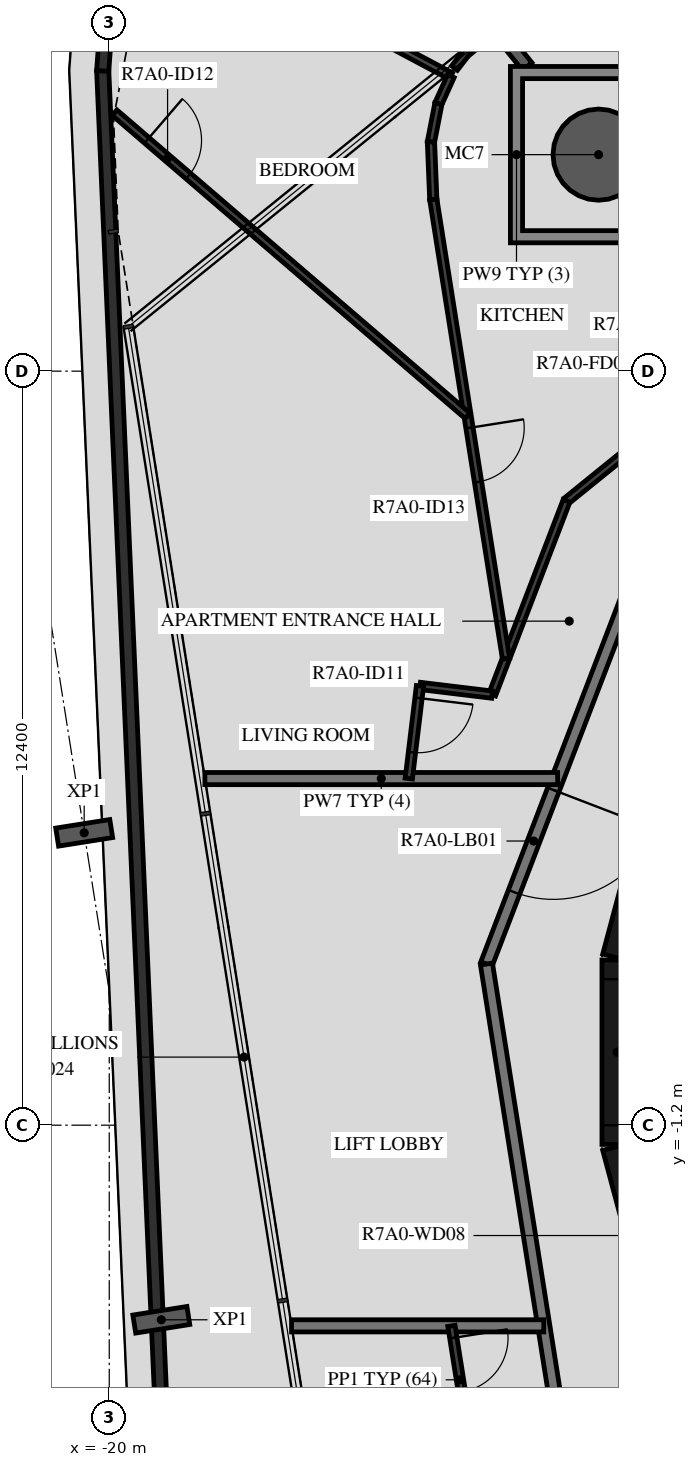
"""IFC4 building model, lengths in metres.
Left out: names, types, materials, properties, quantities, classifications, styles, units other than length and angle.
Written with IfcOpenShell. Run it as: python <this file> out.ifc"""

import sys

from ifc_helpers import new_model, si_unit, direction, frame, frame_2d, origin, origin_2d, place, context, subcontext, project, spatial, polyline, rectangle, hollow_circle, i_section, outline, extrude, element, fill, save


model = new_model("IFC4")
c1 = context("Model", 3, precision=1e-05, world=origin(), true_north=direction((0.0, 1.0)))
c2 = subcontext(c1, "Body", "Model", "MODEL_VIEW")
j1 = project(units=[si_unit("LENGTHUNIT", "METRE"), si_unit("PLANEANGLEUNIT", "RADIAN")], contexts=[c1])
p1 = place(None, origin())
s1 = spatial("IfcSite", under=j1, at=p1, CompositionType="ELEMENT")
p2 = place(p1, origin())
s2 = spatial("IfcBuilding", under=s1, at=p2, CompositionType="ELEMENT")
p3 = place(p2, frame((0.0, 0.0, 263.4)))
s3 = spatial("IfcBuildingStorey", under=s2, at=p3, CompositionType="ELEMENT", Elevation=263.4)
p4 = place(p3, frame((-11.953, 14.76, -0.45), z_axis=(0.0, 0.0, 1.0), x_axis=(1.0, 0.0, 0.0)))
e1 = element("IfcColumn", 1, at=p4, inside=s3, PredefinedType="COLUMN", context=c2, shape_type="SweptSolid", body=[
    extrude(hollow_circle(Radius=0.75, WallThickness=0.035, at=origin_2d()), origin(), (0.0, 0.0, 1.0), 3.57),
])
for number, where, z_axis, x_axis in (
    (2, (-20.412, 3.608, -0.45), (0.0, 0.0, 1.0), (-0.156, 0.988, 0.0)),
    (3, (-19.144, -4.4, -0.45), (0.0, 0.0, 1.0), (-0.156, 0.988, 0.0)),
):
    element("IfcColumn", number, at=place(p3, frame(where, z_axis=z_axis, x_axis=x_axis)), inside=s3, PredefinedType="COLUMN", context=c2, shape_type="SweptSolid", body=[
        extrude(i_section(OverallWidth=0.3, OverallDepth=0.9, WebThickness=0.019, FlangeThickness=0.035, FilletRadius=0.03, at=origin_2d()), origin(), (0.0, 0.0, 1.0), 3.57),
    ])
p5 = place(p3, frame((-18.624, -17.834, 0.03), z_axis=(0.0, 0.0, 1.0), x_axis=(-0.043617910627, 0.999048286057, 0.0)))
e4 = element("IfcWall", 4, at=p5, inside=s3, PredefinedType="PARAPET", context=c2, shape_type="SweptSolid", body=[
    extrude(rectangle(XDim=34.009, YDim=0.2, at=frame_2d((17.004, 0.0))), origin(), (0.0, 0.0, 1.0), 1.5),
])
p6 = place(p3, frame((-20.108, 16.137, 0.03), z_axis=(0.0, 0.0, 1.0), x_axis=(0.072676527807, 0.997355564634, 0.0)))
e5 = element("IfcWall", 5, at=p6, inside=s3, PredefinedType="PARAPET", context=c2, shape_type="SweptSolid", body=[
    extrude(rectangle(XDim=2.257, YDim=0.2, at=frame_2d((1.129, 0.0))), origin(), (0.0, 0.0, 1.0), 1.5),
])
p7 = place(p3, frame((-10.858, 4.479, 0.0), z_axis=(0.0, 0.0, 1.0), x_axis=(-0.258734743916, -0.965948410781, 0.0)))
e6 = element("IfcWall", 6, at=p7, inside=s3, PredefinedType="SHEAR", context=c2, shape_type="SweptSolid", body=[
    extrude(rectangle(XDim=3.033, YDim=0.5, at=frame_2d((1.516, 0.0))), origin(), (0.0, 0.0, 1.0), 3.12),
])
p8 = place(p3, frame((-11.647, 1.516, 0.0), z_axis=(0.0, 0.0, 1.0), x_axis=(0.0, -1.0, 0.0)))
e7 = element("IfcWall", 7, at=p8, inside=s3, PredefinedType="SHEAR", context=c2, shape_type="SweptSolid", body=[
    extrude(rectangle(XDim=3.033, YDim=0.5, at=frame_2d((1.516, 0.0))), origin(), (0.0, 0.0, 1.0), 3.12),
])
p9 = place(p8, frame((0.316, 0.0, 0.0)))
e8 = element("IfcOpeningElement", 8, at=p9, cuts=e7, PredefinedType="OPENING", context=c2, shape_type="SweptSolid", body=[
    extrude(rectangle(XDim=2.4, YDim=2.1, at=frame_2d((1.2, 1.05))), frame((0.0, 0.26, 0.0), z_axis=(0.0, -1.0, 0.0), x_axis=(1.0, 0.0, 0.0)), (0.0, 0.0, 1.0), 0.52),
])
p10 = place(p3, frame((-11.643, -1.55, 0.0), z_axis=(0.0, 0.0, 1.0), x_axis=(0.258734743916, -0.965948410781, 0.0)))
e9 = element("IfcWall", 9, at=p10, inside=s3, PredefinedType="SHEAR", context=c2, shape_type="SweptSolid", body=[
    extrude(rectangle(XDim=3.033, YDim=0.5, at=frame_2d((1.516, 0.0))), origin(), (0.0, 0.0, 1.0), 3.12),
])
p11 = place(p10, frame((1.066, 0.0, 0.0)))
e10 = element("IfcOpeningElement", 10, at=p11, cuts=e9, PredefinedType="OPENING", context=c2, shape_type="SweptSolid", body=[
    extrude(rectangle(XDim=0.9, YDim=2.1, at=frame_2d((0.45, 1.05))), frame((0.0, 0.26, 0.0), z_axis=(0.0, -1.0, 0.0), x_axis=(1.0, 0.0, 0.0)), (0.0, 0.0, 1.0), 0.52),
])
p12 = place(p3, frame((-11.223, 8.154, 0.0), z_axis=(0.0, 0.0, 1.0), x_axis=(-0.358341090983, -0.93359073609, 0.0)))
e11 = element("IfcWall", 11, at=p12, inside=s3, PredefinedType="STANDARD", context=c2, shape_type="SweptSolid", body=[
    extrude(rectangle(XDim=7.181, YDim=0.2, at=frame_2d((3.59, 0.0))), origin(), (0.0, 0.0, 1.0), 3.12),
])
p13 = place(p12, frame((4.114, 0.0, 0.0)))
e12 = element("IfcOpeningElement", 12, at=p13, cuts=e11, PredefinedType="OPENING", context=c2, shape_type="SweptSolid", body=[
    extrude(rectangle(XDim=1.8, YDim=2.1, at=frame_2d((0.9, 1.05))), frame((0.0, 0.11, 0.0), z_axis=(0.0, -1.0, 0.0), x_axis=(1.0, 0.0, 0.0)), (0.0, 0.0, 1.0), 0.22),
])
p14 = place(p3, frame((-13.797, 1.45, 0.0), z_axis=(0.0, 0.0, 1.0), x_axis=(0.156421704315, -0.987690361611, 0.0)))
e13 = element("IfcWall", 13, at=p14, inside=s3, PredefinedType="STANDARD", context=c2, shape_type="SweptSolid", body=[
    extrude(rectangle(XDim=7.181, YDim=0.2, at=frame_2d((3.591, 0.0))), origin(), (0.0, 0.0, 1.0), 3.12),
])
p15 = place(p3, frame((-12.626, 4.5, 0.0), z_axis=(0.0, 0.0, 1.0), x_axis=(-1.0, 0.0, 0.0)))
e14 = element("IfcWall", 14, at=p15, inside=s3, PredefinedType="STANDARD", context=c2, shape_type="SweptSolid", body=[
    extrude(rectangle(XDim=5.802, YDim=0.2, at=frame_2d((2.901, 0.0))), origin(), (0.0, 0.0, 1.0), 3.12),
])
p16 = place(p3, frame((-17.002, -4.5, 0.0), z_axis=(0.0, 0.0, 1.0), x_axis=(1.0, 0.0, 0.0)))
e15 = element("IfcWall", 15, at=p16, inside=s3, PredefinedType="STANDARD", context=c2, shape_type="SweptSolid", body=[
    extrude(rectangle(XDim=4.148, YDim=0.2, at=frame_2d((2.074, 0.0))), origin(), (0.0, 0.0, 1.0), 3.12),
])
p17 = place(p3, frame((-16.953, 20.936, 0.0), z_axis=(0.0, 0.0, 1.0), x_axis=(0.629331057166, -0.777137324085, 0.0)))
e16 = element("IfcWall", 16, at=p17, inside=s3, PredefinedType="STANDARD", context=c2, shape_type="SweptSolid", body=[
    extrude(rectangle(XDim=6.08, YDim=0.2, at=frame_2d((3.04, 0.0))), origin(), (0.0, 0.0, 1.0), 3.12),
])
p18 = place(p3, frame((-9.393, 11.566, 0.0), z_axis=(0.0, 0.0, 1.0), x_axis=(-0.777100258587, -0.629376825205, 0.0)))
e17 = element("IfcWall", 17, at=p18, inside=s3, PredefinedType="PARTITIONING", context=c2, shape_type="SweptSolid", body=[
    extrude(rectangle(XDim=3.971, YDim=0.12, at=frame_2d((1.986, 0.0))), origin(), (0.0, 0.0, 1.0), 3.12),
])
p19 = place(p18, frame((0.2, 0.0, 0.0)))
e18 = element("IfcOpeningElement", 18, at=p19, cuts=e17, PredefinedType="OPENING", context=c2, shape_type="SweptSolid", body=[
    extrude(rectangle(XDim=0.9, YDim=2.1, at=frame_2d((0.45, 1.05))), frame((0.0, 0.07, 0.0), z_axis=(0.0, -1.0, 0.0), x_axis=(1.0, 0.0, 0.0)), (0.0, 0.0, 1.0), 0.14),
])
p20 = place(p3, frame((-12.479, 9.067, 0.0), z_axis=(0.0, 0.0, 1.0), x_axis=(-0.358394302064, -0.933570310286, 0.0)))
e19 = element("IfcWall", 19, at=p20, inside=s3, PredefinedType="PARTITIONING", context=c2, shape_type="SweptSolid", body=[
    extrude(rectangle(XDim=3.414, YDim=0.12, at=frame_2d((1.707, 0.0))), origin(), (0.0, 0.0, 1.0), 3.12),
])
p21 = place(p3, frame((-13.703, 5.88, 0.0), z_axis=(0.0, 0.0, 1.0), x_axis=(-0.992763323859, 0.120087396509, 0.0)))
e20 = element("IfcWall", 20, at=p21, inside=s3, PredefinedType="PARTITIONING", context=c2, shape_type="SweptSolid", body=[
    extrude(rectangle(XDim=1.195, YDim=0.12, at=frame_2d((0.598, 0.0))), origin(), (0.0, 0.0, 1.0), 3.12),
])
p22 = place(p3, frame((-14.89, 6.024, 0.0), z_axis=(0.0, 0.0, 1.0), x_axis=(-0.120255360044, -0.992742992109, 0.0)))
e21 = element("IfcWall", 21, at=p22, inside=s3, PredefinedType="PARTITIONING", context=c2, shape_type="SweptSolid", body=[
    extrude(rectangle(XDim=1.535, YDim=0.12, at=frame_2d((0.768, 0.0))), origin(), (0.0, 0.0, 1.0), 3.12),
])
p23 = place(p22, frame((0.2, 0.0, 0.0)))
e22 = element("IfcOpeningElement", 22, at=p23, cuts=e21, PredefinedType="OPENING", context=c2, shape_type="SweptSolid", body=[
    extrude(rectangle(XDim=0.9, YDim=2.1, at=frame_2d((0.45, 1.05))), frame((0.0, 0.07, 0.0), z_axis=(0.0, -1.0, 0.0), x_axis=(1.0, 0.0, 0.0)), (0.0, 0.0, 1.0), 0.14),
])
p24 = place(p3, frame((-14.323, 16.184, 0.0), z_axis=(0.0, 0.0, 1.0), x_axis=(0.611198506308, 0.791477343887, 0.0)))
e23 = element("IfcWall", 23, at=p24, inside=s3, PredefinedType="PARTITIONING", context=c2, shape_type="SweptSolid", body=[
    extrude(rectangle(XDim=0.642, YDim=0.12, at=frame_2d((0.321, 0.0))), origin(), (0.0, 0.0, 1.0), 3.12),
])
p25 = place(p3, frame((-18.983, 18.499, 0.0), z_axis=(0.0, 0.0, 1.0), x_axis=(0.882948840489, -0.469469216328, 0.0)))
e24 = element("IfcWall", 24, at=p25, inside=s3, PredefinedType="PARTITIONING", context=c2, shape_type="SweptSolid", body=[
    extrude(rectangle(XDim=5.211, YDim=0.12, at=frame_2d((2.605, 0.0))), origin(), (0.0, 0.0, 1.0), 2.73),
])
p26 = place(p25, frame((0.2, 0.0, 0.0)))
e25 = element("IfcOpeningElement", 25, at=p26, cuts=e24, PredefinedType="OPENING", context=c2, shape_type="SweptSolid", body=[
    extrude(rectangle(XDim=0.8, YDim=2.1, at=frame_2d((0.4, 1.05))), frame((0.0, 0.07, 0.0), z_axis=(0.0, -1.0, 0.0), x_axis=(1.0, 0.0, 0.0)), (0.0, 0.0, 1.0), 0.14),
])
p27 = place(p3, frame((-14.382, 16.052, 0.0), z_axis=(0.0, 0.0, 1.0), x_axis=(-0.412099912529, -0.911138662385, 0.0)))
e26 = element("IfcWall", 26, at=p27, inside=s3, PredefinedType="PARTITIONING", context=c2, shape_type="SweptSolid", body=[
    extrude(rectangle(XDim=0.497, YDim=0.12, at=frame_2d((0.249, 0.0))), origin(), (0.0, 0.0, 1.0), 3.12),
])
p28 = place(p3, frame((-14.587, 15.6, 0.0), z_axis=(0.0, 0.0, 1.0), x_axis=(-0.190920556667, -0.98160549155, 0.0)))
e27 = element("IfcWall", 27, at=p28, inside=s3, PredefinedType="PARTITIONING", context=c2, shape_type="SweptSolid", body=[
    extrude(rectangle(XDim=0.642, YDim=0.12, at=frame_2d((0.321, 0.0))), origin(), (0.0, 0.0, 1.0), 3.12),
])
p29 = place(p3, frame((-14.709, 14.969, 0.0), z_axis=(0.0, 0.0, 1.0), x_axis=(0.040729848009, -0.999170195453, 0.0)))
e28 = element("IfcWall", 28, at=p29, inside=s3, PredefinedType="PARTITIONING", context=c2, shape_type="SweptSolid", body=[
    extrude(rectangle(XDim=0.947, YDim=0.12, at=frame_2d((0.474, 0.0))), origin(), (0.0, 0.0, 1.0), 3.12),
])
p30 = place(p3, frame((-14.671, 14.023, 0.0), z_axis=(0.0, 0.0, 1.0), x_axis=(0.156438190471, -0.987687750538, 0.0)))
e29 = element("IfcWall", 29, at=p30, inside=s3, PredefinedType="PARTITIONING", context=c2, shape_type="SweptSolid", body=[
    extrude(rectangle(XDim=7.644, YDim=0.12, at=frame_2d((3.822, 0.0))), origin(), (0.0, 0.0, 1.0), 3.12),
])
p31 = place(p30, frame((3.803, 0.0, 0.0)))
e30 = element("IfcOpeningElement", 30, at=p31, cuts=e29, PredefinedType="OPENING", context=c2, shape_type="SweptSolid", body=[
    extrude(rectangle(XDim=0.9, YDim=2.1, at=frame_2d((0.45, 1.05))), frame((0.0, 0.07, 0.0), z_axis=(0.0, -1.0, 0.0), x_axis=(1.0, 0.0, 0.0)), (0.0, 0.0, 1.0), 0.14),
])
p32 = place(p3, frame((-19.913, 15.451, 0.0), z_axis=(0.0, 0.0, 1.0), x_axis=(0.758623462992, -0.6515293097, 0.0)))
e31 = element("IfcWall", 31, at=p32, inside=s3, PredefinedType="PARTITIONING", context=c2, shape_type="SweptSolid", body=[
    extrude(rectangle(XDim=7.653, YDim=0.12, at=frame_2d((3.826, 0.0))), origin(), (0.0, 0.0, 1.0), 3.12),
])
p33 = place(p32, frame((0.7, 0.0, 0.0)))
e32 = element("IfcOpeningElement", 32, at=p33, cuts=e31, PredefinedType="OPENING", context=c2, shape_type="SweptSolid", body=[
    extrude(rectangle(XDim=0.9, YDim=2.1, at=frame_2d((0.45, 1.05))), frame((0.0, 0.07, 0.0), z_axis=(0.0, -1.0, 0.0), x_axis=(1.0, 0.0, 0.0)), (0.0, 0.0, 1.0), 0.14),
])
p34 = place(p3, frame((-14.373, -4.5, 0.0), z_axis=(0.0, 0.0, 1.0), x_axis=(0.156437152886, -0.987687914878, 0.0)))
e33 = element("IfcWall", 33, at=p34, inside=s3, PredefinedType="PARTITIONING", context=c2, shape_type="SweptSolid", body=[
    extrude(rectangle(XDim=1.796, YDim=0.12, at=frame_2d((0.898, 0.0))), origin(), (0.0, 0.0, 1.0), 3.12),
])
p35 = place(p34, frame((0.2, 0.0, 0.0)))
e34 = element("IfcOpeningElement", 34, at=p35, cuts=e33, PredefinedType="OPENING", context=c2, shape_type="SweptSolid", body=[
    extrude(rectangle(XDim=0.9, YDim=2.1, at=frame_2d((0.45, 1.05))), frame((0.0, 0.07, 0.0), z_axis=(0.0, -1.0, 0.0), x_axis=(1.0, 0.0, 0.0)), (0.0, 0.0, 1.0), 0.14),
])
p36 = place(p3, origin())
e35 = element("IfcWall", 35, at=p36, inside=s3, PredefinedType="STANDARD", context=c2, shape_type="SweptSolid", body=[
    extrude(outline(polyline([(-10.503, 16.21), (-10.503, 13.311), (-13.403, 13.311), (-13.403, 16.21), (-10.503, 16.21)]), holes=[polyline([(-13.203, 13.51), (-10.703, 13.51), (-10.703, 16.01), (-13.203, 16.01), (-13.203, 13.51)])]), origin(), (0.0, 0.0, 1.0), 3.12),
])
p37 = place(p9, origin())
e36 = element("IfcDoor", 36, at=p37, inside=s3, OperationType="DOUBLE_DOOR_SINGLE_SWING", PredefinedType="DOOR", context=c2, shape_type="SweptSolid", body=[
    extrude(rectangle(XDim=2.4, YDim=2.1, at=frame_2d((1.2, 1.05))), frame((0.0, 0.025, 0.0), z_axis=(0.0, -1.0, 0.0), x_axis=(1.0, 0.0, 0.0)), (0.0, 0.0, 1.0), 0.05),
])
fill(e8, e36)
p38 = place(p23, origin())
e37 = element("IfcDoor", 37, at=p38, inside=s3, OperationType="SINGLE_SWING_LEFT", PredefinedType="DOOR", context=c2, shape_type="SweptSolid", body=[
    extrude(rectangle(XDim=0.9, YDim=2.1, at=frame_2d((0.45, 1.05))), frame((0.0, 0.025, 0.0), z_axis=(0.0, -1.0, 0.0), x_axis=(1.0, 0.0, 0.0)), (0.0, 0.0, 1.0), 0.05),
])
fill(e22, e37)
p39 = place(p33, origin())
e38 = element("IfcDoor", 38, at=p39, inside=s3, OperationType="SINGLE_SWING_LEFT", PredefinedType="DOOR", context=c2, shape_type="SweptSolid", body=[
    extrude(rectangle(XDim=0.9, YDim=2.1, at=frame_2d((0.45, 1.05))), frame((0.0, 0.025, 0.0), z_axis=(0.0, -1.0, 0.0), x_axis=(1.0, 0.0, 0.0)), (0.0, 0.0, 1.0), 0.05),
])
fill(e32, e38)
p40 = place(p31, origin())
e39 = element("IfcDoor", 39, at=p40, inside=s3, OperationType="SINGLE_SWING_RIGHT", PredefinedType="DOOR", context=c2, shape_type="SweptSolid", body=[
    extrude(rectangle(XDim=0.9, YDim=2.1, at=frame_2d((0.45, 1.05))), frame((0.0, 0.025, 0.0), z_axis=(0.0, -1.0, 0.0), x_axis=(1.0, 0.0, 0.0)), (0.0, 0.0, 1.0), 0.05),
])
fill(e30, e39)
p41 = place(p35, origin())
e40 = element("IfcDoor", 40, at=p41, inside=s3, OperationType="SINGLE_SWING_RIGHT", PredefinedType="DOOR", context=c2, shape_type="SweptSolid", body=[
    extrude(rectangle(XDim=0.9, YDim=2.1, at=frame_2d((0.45, 1.05))), frame((0.0, 0.025, 0.0), z_axis=(0.0, -1.0, 0.0), x_axis=(1.0, 0.0, 0.0)), (0.0, 0.0, 1.0), 0.05),
])
fill(e34, e40)
p42 = place(p13, origin())
e41 = element("IfcDoor", 41, at=p42, inside=s3, OperationType="DOUBLE_DOOR_SINGLE_SWING", PredefinedType="DOOR", context=c2, shape_type="SweptSolid", body=[
    extrude(rectangle(XDim=1.8, YDim=2.1, at=frame_2d((0.9, 1.05))), frame((0.0, 0.025, 0.0), z_axis=(0.0, -1.0, 0.0), x_axis=(1.0, 0.0, 0.0)), (0.0, 0.0, 1.0), 0.05),
])
fill(e12, e41)
save(model, sys.argv[1])
